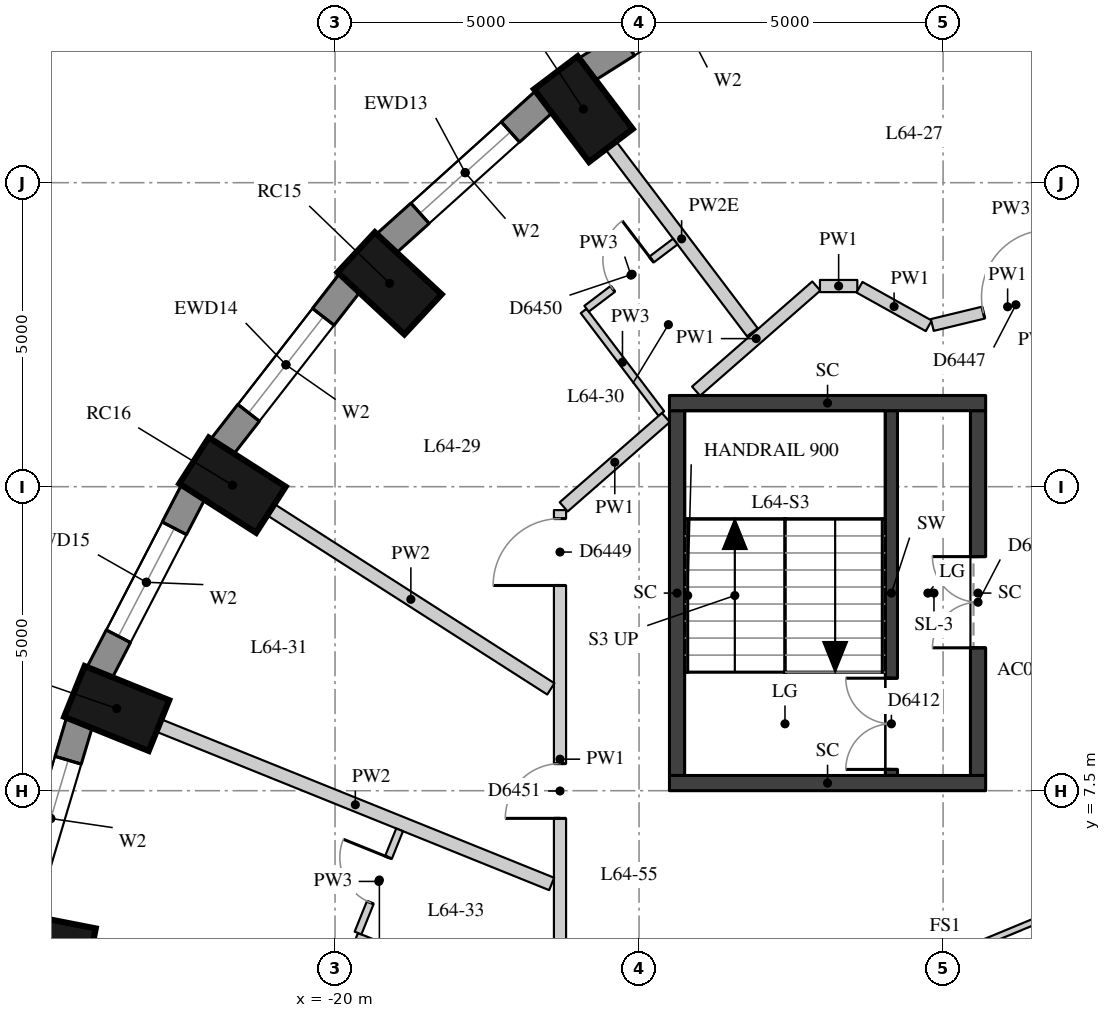
"""IFC4 building model, lengths in metres.
Left out: names, types, materials, properties, quantities, classifications, styles, units other than length and angle.
Written with IfcOpenShell. Run it as: python <this file> out.ifc"""

import sys

from ifc_helpers import new_model, si_unit, direction, frame, frame_2d, origin, origin_2d, place, context, subcontext, project, spatial, rectangle, extrude, element, fill, save


model = new_model("IFC4")
c1 = context("Model", 3, precision=1e-05, world=origin(), true_north=direction((0.0, 1.0)))
c2 = subcontext(c1, "Body", "Model", "MODEL_VIEW")
j1 = project(units=[si_unit("LENGTHUNIT", "METRE"), si_unit("PLANEANGLEUNIT", "RADIAN")], contexts=[c1])
p1 = place(None, origin())
s1 = spatial("IfcSite", under=j1, at=p1, CompositionType="ELEMENT")
p2 = place(p1, origin())
s2 = spatial("IfcBuilding", under=s1, at=p2, CompositionType="ELEMENT")
p3 = place(p2, frame((0.0, 0.0, 225.5)))
s3 = spatial("IfcBuildingStorey", under=s2, at=p3, CompositionType="ELEMENT", Elevation=225.5)
for number, where, z_axis, x_axis in (
    (1, (-15.916, 18.71, 0.0), (0.0, 0.0, 1.0), (-0.604, 0.797, 0.0)),
    (2, (-19.102, 15.845, 0.0), (0.0, 0.0, 1.0), (-0.732, 0.681, 0.0)),
    (3, (-21.687, 12.525, 0.0), (0.0, 0.0, 1.0), (-0.842, 0.539, 0.0)),
    (4, (-23.591, 8.852, 0.0), (0.0, 0.0, 1.0), (-0.927, 0.374, 0.0)),
    (5, (-24.757, 4.937, 0.0), (0.0, 0.0, 1.0), (-0.981, 0.192, 0.0)),
):
    element("IfcColumn", number, at=place(p3, frame(where, z_axis=z_axis, x_axis=x_axis)), inside=s3, PredefinedType="COLUMN", context=c2, shape_type="SweptSolid", body=[
        extrude(rectangle(XDim=1.5, YDim=0.9, at=origin_2d()), origin(), (0.0, 0.0, 1.0), 3.3),
    ])
p4 = place(p3, frame((-12.832, 21.27, 0.0), z_axis=(0.0, 0.0, 1.0), x_axis=(-0.846138482752, -0.532963101918, 0.0)))
e6 = element("IfcWall", 6, at=p4, inside=s3, PredefinedType="SOLIDWALL", context=c2, shape_type="SweptSolid", body=[
    extrude(rectangle(XDim=3.587, YDim=0.45, at=frame_2d((1.793, 0.0))), origin(), (0.0, 0.0, 1.0), 2.85),
])
p5 = place(p4, frame((0.793, 0.0, 0.4)))
e7 = element("IfcOpeningElement", 7, at=p5, cuts=e6, PredefinedType="OPENING", context=c2, shape_type="SweptSolid", body=[
    extrude(rectangle(XDim=2.0, YDim=1.75, at=frame_2d((1.0, 0.875))), frame((0.0, 0.235, 0.0), z_axis=(0.0, -1.0, 0.0), x_axis=(1.0, 0.0, 0.0)), (0.0, 0.0, 1.0), 0.47),
])
p6 = place(p3, frame((-16.553, 18.84, 0.0), z_axis=(0.0, 0.0, 1.0), x_axis=(-0.743442727602, -0.668799604348, 0.0)))
e8 = element("IfcWall", 8, at=p6, inside=s3, PredefinedType="SOLIDWALL", context=c2, shape_type="SweptSolid", body=[
    extrude(rectangle(XDim=3.513, YDim=0.45, at=frame_2d((1.756, 0.0))), origin(), (0.0, 0.0, 1.0), 2.85),
])
p7 = place(p6, frame((0.756, 0.0, 0.4)))
e9 = element("IfcOpeningElement", 9, at=p7, cuts=e8, PredefinedType="OPENING", context=c2, shape_type="SweptSolid", body=[
    extrude(rectangle(XDim=2.0, YDim=1.75, at=frame_2d((1.0, 0.875))), frame((0.0, 0.235, 0.0), z_axis=(0.0, -1.0, 0.0), x_axis=(1.0, 0.0, 0.0)), (0.0, 0.0, 1.0), 0.47),
])
p8 = place(p3, frame((-19.751, 15.861, 0.0), z_axis=(0.0, 0.0, 1.0), x_axis=(-0.614220816451, -0.789134201919, 0.0)))
e10 = element("IfcWall", 10, at=p8, inside=s3, PredefinedType="SOLIDWALL", context=c2, shape_type="SweptSolid", body=[
    extrude(rectangle(XDim=3.438, YDim=0.45, at=frame_2d((1.719, 0.0))), origin(), (0.0, 0.0, 1.0), 2.85),
])
p9 = place(p8, frame((0.719, 0.0, 0.4)))
e11 = element("IfcOpeningElement", 11, at=p9, cuts=e10, PredefinedType="OPENING", context=c2, shape_type="SweptSolid", body=[
    extrude(rectangle(XDim=2.0, YDim=1.75, at=frame_2d((1.0, 0.875))), frame((0.0, 0.235, 0.0), z_axis=(0.0, -1.0, 0.0), x_axis=(1.0, 0.0, 0.0)), (0.0, 0.0, 1.0), 0.47),
])
p10 = place(p3, frame((-22.327, 12.424, 0.0), z_axis=(0.0, 0.0, 1.0), x_axis=(-0.460232593174, -0.887798378113, 0.0)))
e12 = element("IfcWall", 12, at=p10, inside=s3, PredefinedType="SOLIDWALL", context=c2, shape_type="SweptSolid", body=[
    extrude(rectangle(XDim=3.371, YDim=0.45, at=frame_2d((1.685, 0.0))), origin(), (0.0, 0.0, 1.0), 2.85),
])
p11 = place(p10, frame((0.685, 0.0, 0.4)))
e13 = element("IfcOpeningElement", 13, at=p11, cuts=e12, PredefinedType="OPENING", context=c2, shape_type="SweptSolid", body=[
    extrude(rectangle(XDim=2.0, YDim=1.75, at=frame_2d((1.0, 0.875))), frame((0.0, 0.235, 0.0), z_axis=(0.0, -1.0, 0.0), x_axis=(1.0, 0.0, 0.0)), (0.0, 0.0, 1.0), 0.47),
])
p12 = place(p3, frame((-24.2, 8.634, 0.0), z_axis=(0.0, 0.0, 1.0), x_axis=(-0.285444972963, -0.958395099847, 0.0)))
e14 = element("IfcWall", 14, at=p12, inside=s3, PredefinedType="SOLIDWALL", context=c2, shape_type="SweptSolid", body=[
    extrude(rectangle(XDim=3.32, YDim=0.45, at=frame_2d((1.66, 0.0))), origin(), (0.0, 0.0, 1.0), 2.85),
])
p13 = place(p12, frame((0.66, 0.0, 0.4)))
e15 = element("IfcOpeningElement", 15, at=p13, cuts=e14, PredefinedType="OPENING", context=c2, shape_type="SweptSolid", body=[
    extrude(rectangle(XDim=2.0, YDim=1.75, at=frame_2d((1.0, 0.875))), frame((0.0, 0.235, 0.0), z_axis=(0.0, -1.0, 0.0), x_axis=(1.0, 0.0, 0.0)), (0.0, 0.0, 1.0), 0.47),
])
p14 = place(p3, frame((-10.85, 7.75, 0.0), z_axis=(0.0, 0.0, 1.0), x_axis=(0.0, 1.0, 0.0)))
e16 = element("IfcWall", 16, at=p14, inside=s3, PredefinedType="SHEAR", context=c2, shape_type="SweptSolid", body=[
    extrude(rectangle(XDim=6.0, YDim=0.2, at=frame_2d((3.0, 0.0))), origin(), (0.0, 0.0, 1.0), 2.85),
])
p15 = place(p14, frame((0.1, 0.0, 0.0)))
e17 = element("IfcOpeningElement", 17, at=p15, cuts=e16, PredefinedType="OPENING", context=c2, shape_type="SweptSolid", body=[
    extrude(rectangle(XDim=1.5, YDim=2.1, at=frame_2d((0.75, 1.05))), frame((0.0, 0.11, 0.0), z_axis=(0.0, -1.0, 0.0), x_axis=(1.0, 0.0, 0.0)), (0.0, 0.0, 1.0), 0.22),
])
p16 = place(p3, frame((-14.375, 7.75, -0.28), z_axis=(0.0, 0.0, 1.0), x_axis=(0.0, 1.0, 0.0)))
e18 = element("IfcWall", 18, at=p16, inside=s3, PredefinedType="SHEAR", context=c2, shape_type="SweptSolid", body=[
    extrude(rectangle(XDim=6.0, YDim=0.25, at=frame_2d((3.0, 0.0))), origin(), (0.0, 0.0, 1.0), 3.13),
])
p17 = place(p3, frame((-9.425, 7.75, -0.28), z_axis=(0.0, 0.0, 1.0), x_axis=(0.0, 1.0, 0.0)))
e19 = element("IfcWall", 19, at=p17, inside=s3, PredefinedType="SHEAR", context=c2, shape_type="SweptSolid", body=[
    extrude(rectangle(XDim=6.0, YDim=0.25, at=frame_2d((3.0, 0.0))), origin(), (0.0, 0.0, 1.0), 3.13),
])
p18 = place(p17, frame((2.1, 0.0, 0.28)))
e20 = element("IfcOpeningElement", 20, at=p18, cuts=e19, PredefinedType="OPENING", context=c2, shape_type="SweptSolid", body=[
    extrude(rectangle(XDim=1.5, YDim=2.1, at=frame_2d((0.75, 1.05))), frame((0.0, 0.135, 0.0), z_axis=(0.0, -1.0, 0.0), x_axis=(1.0, 0.0, 0.0)), (0.0, 0.0, 1.0), 0.27),
])
for number, where, z_axis, x_axis in (
    (21, (-14.5, 13.875, -0.28), (0.0, 0.0, 1.0), (1.0, 0.0, 0.0)),
    (22, (-14.5, 7.625, -0.28), (0.0, 0.0, 1.0), (1.0, 0.0, 0.0)),
):
    element("IfcWall", number, at=place(p3, frame(where, z_axis=z_axis, x_axis=x_axis)), inside=s3, PredefinedType="SHEAR", context=c2, shape_type="SweptSolid", body=[
        extrude(rectangle(XDim=5.2, YDim=0.25, at=frame_2d((2.6, 0.0))), origin(), (0.0, 0.0, 1.0), 3.13),
    ])
p19 = place(p3, frame((-16.3, 3.922, 0.0), z_axis=(0.0, 0.0, 1.0), x_axis=(0.0, 1.0, 0.0)))
e23 = element("IfcWall", 23, at=p19, inside=s3, PredefinedType="PARTITIONING", context=c2, shape_type="SweptSolid", body=[
    extrude(rectangle(XDim=8.193, YDim=0.2, at=frame_2d((4.097, 0.0))), origin(), (0.0, 0.0, 1.0), 2.85),
])
p20 = place(p19, frame((6.953, 0.0, 0.0)))
e24 = element("IfcOpeningElement", 24, at=p20, cuts=e23, PredefinedType="OPENING", context=c2, shape_type="SweptSolid", body=[
    extrude(rectangle(XDim=1.1, YDim=2.1, at=frame_2d((0.55, 1.05))), frame((0.0, 0.11, 0.0), z_axis=(0.0, -1.0, 0.0), x_axis=(1.0, 0.0, 0.0)), (0.0, 0.0, 1.0), 0.22),
])
p21 = place(p19, frame((3.123, 0.0, 0.0)))
e25 = element("IfcOpeningElement", 25, at=p21, cuts=e23, PredefinedType="OPENING", context=c2, shape_type="SweptSolid", body=[
    extrude(rectangle(XDim=0.9, YDim=2.1, at=frame_2d((0.45, 1.05))), frame((0.0, 0.11, 0.0), z_axis=(0.0, -1.0, 0.0), x_axis=(1.0, 0.0, 0.0)), (0.0, 0.0, 1.0), 0.22),
])
p22 = place(p3, frame((-16.24, 12.168, 0.0), z_axis=(0.0, 0.0, 1.0), x_axis=(0.752820521129, 0.658225844956, 0.0)))
e26 = element("IfcWall", 26, at=p22, inside=s3, PredefinedType="PARTITIONING", context=c2, shape_type="SweptSolid", body=[
    extrude(rectangle(XDim=2.232, YDim=0.2, at=frame_2d((1.116, 0.0))), origin(), (0.0, 0.0, 1.0), 2.85),
])
p23 = place(p3, frame((-14.063, 14.071, 0.0), z_axis=(0.0, 0.0, 1.0), x_axis=(0.752870230185, 0.6581689878, 0.0)))
e27 = element("IfcWall", 27, at=p23, inside=s3, PredefinedType="PARTITIONING", context=c2, shape_type="SweptSolid", body=[
    extrude(rectangle(XDim=2.627, YDim=0.2, at=frame_2d((1.313, 0.0))), origin(), (0.0, 0.0, 1.0), 2.85),
])
p24 = place(p3, frame((-12.025, 15.8, 0.0), z_axis=(0.0, 0.0, 1.0), x_axis=(1.0, 0.0, 0.0)))
e28 = element("IfcWall", 28, at=p24, inside=s3, PredefinedType="PARTITIONING", context=c2, shape_type="SweptSolid", body=[
    extrude(rectangle(XDim=0.615, YDim=0.2, at=frame_2d((0.307, 0.0))), origin(), (0.0, 0.0, 1.0), 2.85),
])
p25 = place(p3, frame((-11.375, 15.781, 0.0), z_axis=(0.0, 0.0, 1.0), x_axis=(0.873538410035, -0.486755222051, 0.0)))
e29 = element("IfcWall", 29, at=p25, inside=s3, PredefinedType="PARTITIONING", context=c2, shape_type="SweptSolid", body=[
    extrude(rectangle(XDim=1.304, YDim=0.2, at=frame_2d((0.652, 0.0))), origin(), (0.0, 0.0, 1.0), 2.85),
])
p26 = place(p3, frame((-10.177, 15.16, 0.0), z_axis=(0.0, 0.0, 1.0), x_axis=(0.971984190663, 0.235046236094, 0.0)))
e30 = element("IfcWall", 30, at=p26, inside=s3, PredefinedType="PARTITIONING", context=c2, shape_type="SweptSolid", body=[
    extrude(rectangle(XDim=2.549, YDim=0.2, at=frame_2d((1.274, 0.0))), origin(), (0.0, 0.0, 1.0), 2.85),
])
p27 = place(p26, frame((0.865, 0.0, 0.0)))
e31 = element("IfcOpeningElement", 31, at=p27, cuts=e30, PredefinedType="OPENING", context=c2, shape_type="SweptSolid", body=[
    extrude(rectangle(XDim=1.1, YDim=2.1, at=frame_2d((0.55, 1.05))), frame((0.0, 0.11, 0.0), z_axis=(0.0, -1.0, 0.0), x_axis=(1.0, 0.0, 0.0)), (0.0, 0.0, 1.0), 0.22),
])
p28 = place(p3, frame((-15.463, 18.113, 0.0), z_axis=(0.0, 0.0, 1.0), x_axis=(0.603591792806, -0.79729351412, 0.0)))
e32 = element("IfcWall", 32, at=p28, inside=s3, PredefinedType="PARTITIONING", context=c2, shape_type="SweptSolid", body=[
    extrude(rectangle(XDim=3.854, YDim=0.22, at=frame_2d((1.927, 0.0))), origin(), (0.0, 0.0, 1.0), 2.4),
])
p29 = place(p3, frame((-21.055, 12.121, 0.0), z_axis=(0.0, 0.0, 1.0), x_axis=(0.842286811608, -0.539029616061, 0.0)))
e33 = element("IfcWall", 33, at=p29, inside=s3, PredefinedType="PARTITIONING", context=c2, shape_type="SweptSolid", body=[
    extrude(rectangle(XDim=5.466, YDim=0.22, at=frame_2d((2.733, 0.0))), origin(), (0.0, 0.0, 1.0), 2.85),
])
p30 = place(p3, frame((-22.896, 8.571, 0.0), z_axis=(0.0, 0.0, 1.0), x_axis=(0.927387137769, -0.374103056256, 0.0)))
e34 = element("IfcWall", 34, at=p30, inside=s3, PredefinedType="PARTITIONING", context=c2, shape_type="SweptSolid", body=[
    extrude(rectangle(XDim=6.964, YDim=0.22, at=frame_2d((3.482, 0.0))), origin(), (0.0, 0.0, 1.0), 2.85),
])
p31 = place(p3, frame((-14.634, 13.704, 0.0), z_axis=(0.0, 0.0, 1.0), x_axis=(-0.603613230526, 0.797277284221, 0.0)))
e35 = element("IfcWall", 35, at=p31, inside=s3, PredefinedType="PARTITIONING", context=c2, shape_type="SweptSolid", body=[
    extrude(rectangle(XDim=2.115, YDim=0.12, at=frame_2d((1.058, 0.0))), origin(), (0.0, 0.0, 1.0), 2.85),
])
p32 = place(p3, frame((-16.433, 3.808, 0.0), z_axis=(0.0, 0.0, 1.0), x_axis=(-0.927374031513, 0.374135544522, 0.0)))
e36 = element("IfcWall", 36, at=p32, inside=s3, PredefinedType="PARTITIONING", context=c2, shape_type="SweptSolid", body=[
    extrude(rectangle(XDim=3.464, YDim=0.12, at=frame_2d((1.732, 0.0))), origin(), (0.0, 0.0, 1.0), 2.85),
])
p33 = place(p3, frame((-15.863, 15.427, 0.0), z_axis=(0.0, 0.0, 1.0), x_axis=(0.79730226728, 0.603580230451, 0.0)))
e37 = element("IfcWall", 37, at=p33, inside=s3, PredefinedType="PARTITIONING", context=c2, shape_type="SweptSolid", body=[
    extrude(rectangle(XDim=1.83, YDim=0.12, at=frame_2d((0.915, 0.0))), origin(), (0.0, 0.0, 1.0), 2.85),
])
p34 = place(p33, frame((0.54, 0.0, 0.0)))
e38 = element("IfcOpeningElement", 38, at=p34, cuts=e37, PredefinedType="OPENING", context=c2, shape_type="SweptSolid", body=[
    extrude(rectangle(XDim=0.8, YDim=2.1, at=frame_2d((0.4, 1.05))), frame((0.0, 0.07, 0.0), z_axis=(0.0, -1.0, 0.0), x_axis=(1.0, 0.0, 0.0)), (0.0, 0.0, 1.0), 0.14),
])
p35 = place(p3, frame((-19.622, 5.159, 0.0), z_axis=(0.0, 0.0, 1.0), x_axis=(0.373873925611, 0.927479534948, 0.0)))
e39 = element("IfcWall", 39, at=p35, inside=s3, PredefinedType="PARTITIONING", context=c2, shape_type="SweptSolid", body=[
    extrude(rectangle(XDim=1.83, YDim=0.12, at=frame_2d((0.915, 0.0))), origin(), (0.0, 0.0, 1.0), 2.85),
])
p36 = place(p35, frame((0.54, 0.0, 0.0)))
e40 = element("IfcOpeningElement", 40, at=p36, cuts=e39, PredefinedType="OPENING", context=c2, shape_type="SweptSolid", body=[
    extrude(rectangle(XDim=0.8, YDim=2.1, at=frame_2d((0.4, 1.05))), frame((0.0, 0.07, 0.0), z_axis=(0.0, -1.0, 0.0), x_axis=(1.0, 0.0, 0.0)), (0.0, 0.0, 1.0), 0.14),
])
p37 = place(p3, frame((-11.927, 3.927, 0.0), z_axis=(0.0, 0.0, 1.0), x_axis=(0.923860025149, 0.382730523909, 0.0)))
e41 = element("IfcWall", 41, at=p37, inside=s3, PredefinedType="PARTITIONING", context=c2, shape_type="SweptSolid", body=[
    extrude(rectangle(XDim=4.251, YDim=0.1, at=frame_2d((2.125, 0.0))), origin(), (0.0, 0.0, 1.0), 2.85),
])
p38 = place(p7, origin())
e42 = element("IfcWindow", 42, at=p38, inside=s3, PartitioningType="SINGLE_PANEL", PredefinedType="WINDOW", context=c2, shape_type="SweptSolid", body=[
    extrude(rectangle(XDim=2.0, YDim=1.75, at=frame_2d((1.0, 0.875))), frame((0.0, 0.035, 0.0), z_axis=(0.0, -1.0, 0.0), x_axis=(1.0, 0.0, 0.0)), (0.0, 0.0, 1.0), 0.06),
])
fill(e9, e42)
p39 = place(p9, origin())
e43 = element("IfcWindow", 43, at=p39, inside=s3, PartitioningType="SINGLE_PANEL", PredefinedType="WINDOW", context=c2, shape_type="SweptSolid", body=[
    extrude(rectangle(XDim=2.0, YDim=1.75, at=frame_2d((1.0, 0.875))), frame((0.0, 0.035, 0.0), z_axis=(0.0, -1.0, 0.0), x_axis=(1.0, 0.0, 0.0)), (0.0, 0.0, 1.0), 0.06),
])
fill(e11, e43)
p40 = place(p11, origin())
e44 = element("IfcWindow", 44, at=p40, inside=s3, PartitioningType="SINGLE_PANEL", PredefinedType="WINDOW", context=c2, shape_type="SweptSolid", body=[
    extrude(rectangle(XDim=2.0, YDim=1.75, at=frame_2d((1.0, 0.875))), frame((0.0, 0.035, 0.0), z_axis=(0.0, -1.0, 0.0), x_axis=(1.0, 0.0, 0.0)), (0.0, 0.0, 1.0), 0.06),
])
fill(e13, e44)
p41 = place(p13, origin())
e45 = element("IfcWindow", 45, at=p41, inside=s3, PartitioningType="SINGLE_PANEL", PredefinedType="WINDOW", context=c2, shape_type="SweptSolid", body=[
    extrude(rectangle(XDim=2.0, YDim=1.75, at=frame_2d((1.0, 0.875))), frame((0.0, 0.035, 0.0), z_axis=(0.0, -1.0, 0.0), x_axis=(1.0, 0.0, 0.0)), (0.0, 0.0, 1.0), 0.06),
])
fill(e15, e45)
p42 = place(p15, origin())
e46 = element("IfcDoor", 46, at=p42, inside=s3, OperationType="DOUBLE_DOOR_SINGLE_SWING", PredefinedType="DOOR", context=c2, shape_type="SweptSolid", body=[
    extrude(rectangle(XDim=1.5, YDim=2.1, at=frame_2d((0.75, 1.05))), frame((0.0, 0.025, 0.0), z_axis=(0.0, -1.0, 0.0), x_axis=(1.0, 0.0, 0.0)), (0.0, 0.0, 1.0), 0.05),
])
fill(e17, e46)
p43 = place(p18, origin())
e47 = element("IfcDoor", 47, at=p43, inside=s3, OperationType="DOUBLE_DOOR_SINGLE_SWING", PredefinedType="DOOR", context=c2, shape_type="SweptSolid", body=[
    extrude(rectangle(XDim=1.5, YDim=2.1, at=frame_2d((0.75, 1.05))), frame((0.0, 0.025, 0.0), z_axis=(0.0, -1.0, 0.0), x_axis=(1.0, 0.0, 0.0)), (0.0, 0.0, 1.0), 0.05),
])
fill(e20, e47)
p44 = place(p27, origin())
e48 = element("IfcDoor", 48, at=p44, inside=s3, OperationType="SINGLE_SWING_RIGHT", PredefinedType="DOOR", context=c2, shape_type="SweptSolid", body=[
    extrude(rectangle(XDim=1.1, YDim=2.1, at=frame_2d((0.55, 1.05))), frame((0.0, 0.025, 0.0), z_axis=(0.0, -1.0, 0.0), x_axis=(1.0, 0.0, 0.0)), (0.0, 0.0, 1.0), 0.05),
])
fill(e31, e48)
p45 = place(p20, origin())
e49 = element("IfcDoor", 49, at=p45, inside=s3, OperationType="SINGLE_SWING_LEFT", PredefinedType="DOOR", context=c2, shape_type="SweptSolid", body=[
    extrude(rectangle(XDim=1.1, YDim=2.1, at=frame_2d((0.55, 1.05))), frame((0.0, 0.025, 0.0), z_axis=(0.0, -1.0, 0.0), x_axis=(1.0, 0.0, 0.0)), (0.0, 0.0, 1.0), 0.05),
])
fill(e24, e49)
p46 = place(p34, origin())
e50 = element("IfcDoor", 50, at=p46, inside=s3, OperationType="SINGLE_SWING_RIGHT", PredefinedType="DOOR", context=c2, shape_type="SweptSolid", body=[
    extrude(rectangle(XDim=0.8, YDim=2.1, at=frame_2d((0.4, 1.05))), frame((0.0, 0.025, 0.0), z_axis=(0.0, -1.0, 0.0), x_axis=(1.0, 0.0, 0.0)), (0.0, 0.0, 1.0), 0.05),
])
fill(e38, e50)
p47 = place(p21, origin())
e51 = element("IfcDoor", 51, at=p47, inside=s3, OperationType="SINGLE_SWING_LEFT", PredefinedType="DOOR", context=c2, shape_type="SweptSolid", body=[
    extrude(rectangle(XDim=0.9, YDim=2.1, at=frame_2d((0.45, 1.05))), frame((0.0, 0.025, 0.0), z_axis=(0.0, -1.0, 0.0), x_axis=(1.0, 0.0, 0.0)), (0.0, 0.0, 1.0), 0.05),
])
fill(e25, e51)
p48 = place(p36, origin())
e52 = element("IfcDoor", 52, at=p48, inside=s3, OperationType="SINGLE_SWING_RIGHT", PredefinedType="DOOR", context=c2, shape_type="SweptSolid", body=[
    extrude(rectangle(XDim=0.8, YDim=2.1, at=frame_2d((0.4, 1.05))), frame((0.0, 0.025, 0.0), z_axis=(0.0, -1.0, 0.0), x_axis=(1.0, 0.0, 0.0)), (0.0, 0.0, 1.0), 0.05),
])
fill(e40, e52)
save(model, sys.argv[1])
